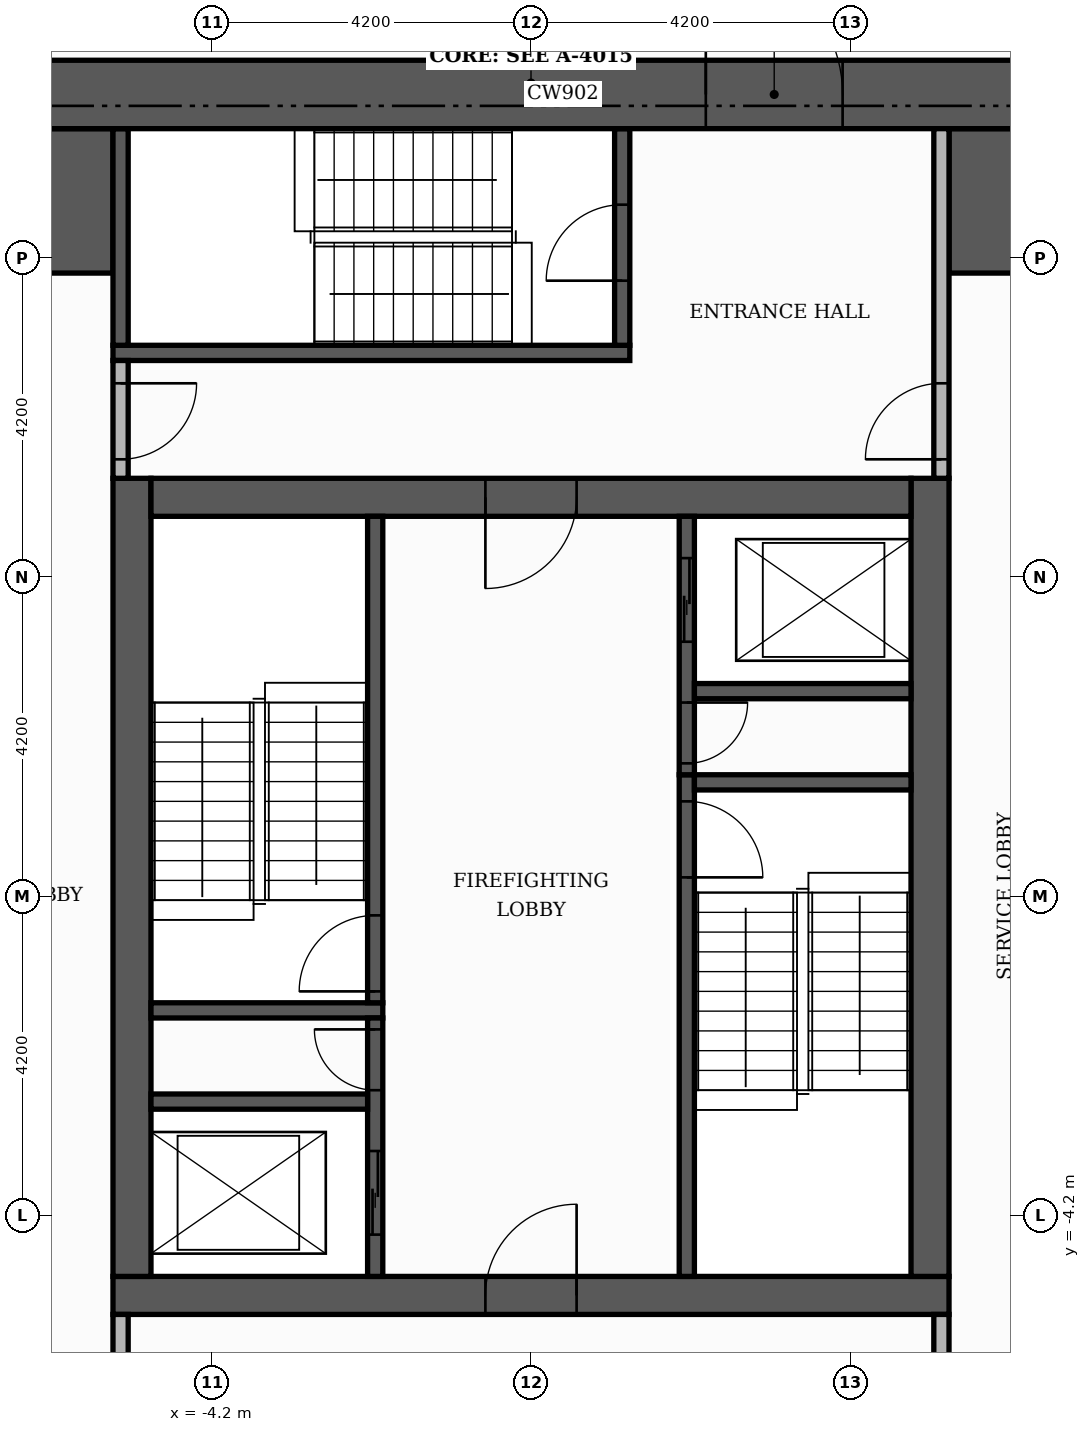
"""IFC4 building model, lengths in metres.
Left out: names, types, materials, properties, quantities, classifications, styles, units other than length and angle.
Written with IfcOpenShell. Run it as: python <this file> out.ifc"""

import sys

from ifc_helpers import new_model, si_unit, direction, frame, frame_2d, origin, place, context, subcontext, project, spatial, rectangle, extrude, element, fill, save


model = new_model("IFC4")
c1 = context("Model", 3, precision=1e-05, world=origin(), true_north=direction((0.0, 1.0)))
c2 = subcontext(c1, "Body", "Model", "MODEL_VIEW")
j1 = project(units=[si_unit("LENGTHUNIT", "METRE"), si_unit("PLANEANGLEUNIT", "RADIAN")], contexts=[c1])
p1 = place(None, origin())
s1 = spatial("IfcSite", under=j1, at=p1, CompositionType="ELEMENT")
p2 = place(p1, origin())
s2 = spatial("IfcBuilding", under=s1, at=p2, CompositionType="ELEMENT")
p3 = place(p2, frame((0.0, 0.0, 98.7)))
s3 = spatial("IfcBuildingStorey", under=s2, at=p3, CompositionType="ELEMENT", Elevation=98.7)
p4 = place(p3, frame((-5.5, -5.25, 0.0), z_axis=(0.0, 0.0, 1.0), x_axis=(1.0, 0.0, 0.0)))
e1 = element("IfcWall", 1, at=p4, inside=s3, PredefinedType="SHEAR", context=c2, shape_type="SweptSolid", body=[
    extrude(rectangle(XDim=11.0, YDim=0.5, at=frame_2d((5.5, 0.0))), origin(), (0.0, 0.0, 1.0), 3.48),
])
p5 = place(p4, frame((4.9, 0.0, 0.0)))
e2 = element("IfcOpeningElement", 2, at=p5, cuts=e1, PredefinedType="OPENING", context=c2, shape_type="SweptSolid", body=[
    extrude(rectangle(XDim=1.2, YDim=2.1, at=frame_2d((0.6, 1.05))), frame((0.0, 0.26, 0.0), z_axis=(0.0, -1.0, 0.0), x_axis=(1.0, 0.0, 0.0)), (0.0, 0.0, 1.0), 0.52),
])
for number, where, z_axis, x_axis in (
    (3, (-5.25, -5.0, 0.0), (0.0, 0.0, 1.0), (0.0, 1.0, 0.0)),
    (4, (5.25, -5.0, 0.0), (0.0, 0.0, 1.0), (0.0, 1.0, 0.0)),
):
    element("IfcWall", number, at=place(p3, frame(where, z_axis=z_axis, x_axis=x_axis)), inside=s3, PredefinedType="SHEAR", context=c2, shape_type="SweptSolid", body=[
        extrude(rectangle(XDim=10.5, YDim=0.5, at=frame_2d((5.25, 0.0))), origin(), (0.0, 0.0, 1.0), 3.48),
    ])
p6 = place(p3, frame((-5.0, 5.25, 0.0), z_axis=(0.0, 0.0, 1.0), x_axis=(1.0, 0.0, 0.0)))
e5 = element("IfcWall", 5, at=p6, inside=s3, PredefinedType="SHEAR", context=c2, shape_type="SweptSolid", body=[
    extrude(rectangle(XDim=10.0, YDim=0.5, at=frame_2d((5.0, 0.0))), origin(), (0.0, 0.0, 1.0), 3.48),
])
p7 = place(p6, frame((4.4, 0.0, 0.0)))
e6 = element("IfcOpeningElement", 6, at=p7, cuts=e5, PredefinedType="OPENING", context=c2, shape_type="SweptSolid", body=[
    extrude(rectangle(XDim=1.2, YDim=2.1, at=frame_2d((0.6, 1.05))), frame((0.0, 0.26, 0.0), z_axis=(0.0, -1.0, 0.0), x_axis=(1.0, 0.0, 0.0)), (0.0, 0.0, 1.0), 0.52),
])
for number, where, z_axis, x_axis in (
    (7, (-10.1, 9.15, 0.0), (0.0, 0.0, 1.0), (1.0, 0.0, 0.0)),
    (8, (5.5, 9.15, 0.0), (0.0, 0.0, 1.0), (1.0, 0.0, 0.0)),
):
    element("IfcWall", number, at=place(p3, frame(where, z_axis=z_axis, x_axis=x_axis)), inside=s3, PredefinedType="SHEAR", context=c2, shape_type="SweptSolid", body=[
        extrude(rectangle(XDim=4.6, YDim=1.9, at=frame_2d((2.3, 0.0))), origin(), (0.0, 0.0, 1.0), 3.48),
    ])
p8 = place(p3, frame((2.05, -5.0, 0.0), z_axis=(0.0, 0.0, 1.0), x_axis=(0.0, 1.0, 0.0)))
e9 = element("IfcWall", 9, at=p8, inside=s3, PredefinedType="SHEAR", context=c2, shape_type="SweptSolid", body=[
    extrude(rectangle(XDim=6.6, YDim=0.2, at=frame_2d((3.3, 0.0))), origin(), (0.0, 0.0, 1.0), 3.48),
])
p9 = place(p8, frame((5.25, 0.0, 0.0)))
e10 = element("IfcOpeningElement", 10, at=p9, cuts=e9, PredefinedType="OPENING", context=c2, shape_type="SweptSolid", body=[
    extrude(rectangle(XDim=1.0, YDim=2.1, at=frame_2d((0.5, 1.05))), frame((0.0, 0.11, 0.0), z_axis=(0.0, -1.0, 0.0), x_axis=(1.0, 0.0, 0.0)), (0.0, 0.0, 1.0), 0.22),
])
p10 = place(p3, frame((-5.0, -1.5, 0.0), z_axis=(0.0, 0.0, 1.0), x_axis=(1.0, 0.0, 0.0)))
e11 = element("IfcWall", 11, at=p10, inside=s3, PredefinedType="SHEAR", context=c2, shape_type="SweptSolid", body=[
    extrude(rectangle(XDim=3.05, YDim=0.2, at=frame_2d((1.525, 0.0))), origin(), (0.0, 0.0, 1.0), 3.48),
])
p11 = place(p3, frame((-2.05, -1.4, 0.0), z_axis=(0.0, 0.0, 1.0), x_axis=(0.0, 1.0, 0.0)))
e12 = element("IfcWall", 12, at=p11, inside=s3, PredefinedType="SHEAR", context=c2, shape_type="SweptSolid", body=[
    extrude(rectangle(XDim=6.4, YDim=0.2, at=frame_2d((3.2, 0.0))), origin(), (0.0, 0.0, 1.0), 3.48),
])
p12 = place(p11, frame((0.15, 0.0, 0.0)))
e13 = element("IfcOpeningElement", 13, at=p12, cuts=e12, PredefinedType="OPENING", context=c2, shape_type="SweptSolid", body=[
    extrude(rectangle(XDim=1.0, YDim=2.1, at=frame_2d((0.5, 1.05))), frame((0.0, 0.11, 0.0), z_axis=(0.0, -1.0, 0.0), x_axis=(1.0, 0.0, 0.0)), (0.0, 0.0, 1.0), 0.22),
])
p13 = place(p3, frame((2.15, 1.5, 0.0), z_axis=(0.0, 0.0, 1.0), x_axis=(1.0, 0.0, 0.0)))
e14 = element("IfcWall", 14, at=p13, inside=s3, PredefinedType="SHEAR", context=c2, shape_type="SweptSolid", body=[
    extrude(rectangle(XDim=2.85, YDim=0.2, at=frame_2d((1.425, 0.0))), origin(), (0.0, 0.0, 1.0), 3.48),
])
p14 = place(p3, frame((-5.5, 7.15, 0.0), z_axis=(0.0, 0.0, 1.0), x_axis=(1.0, 0.0, 0.0)))
e15 = element("IfcWall", 15, at=p14, inside=s3, PredefinedType="SHEAR", context=c2, shape_type="SweptSolid", body=[
    extrude(rectangle(XDim=6.8, YDim=0.2, at=frame_2d((3.4, 0.0))), origin(), (0.0, 0.0, 1.0), 3.48),
])
p15 = place(p3, frame((-5.4, 7.25, 0.0), z_axis=(0.0, 0.0, 1.0), x_axis=(0.0, 1.0, 0.0)))
e16 = element("IfcWall", 16, at=p15, inside=s3, PredefinedType="SHEAR", context=c2, shape_type="SweptSolid", body=[
    extrude(rectangle(XDim=2.85, YDim=0.2, at=frame_2d((1.425, 0.0))), origin(), (0.0, 0.0, 1.0), 3.48),
])
p16 = place(p3, frame((1.2, 7.25, 0.0), z_axis=(0.0, 0.0, 1.0), x_axis=(0.0, 1.0, 0.0)))
e17 = element("IfcWall", 17, at=p16, inside=s3, PredefinedType="SHEAR", context=c2, shape_type="SweptSolid", body=[
    extrude(rectangle(XDim=2.85, YDim=0.2, at=frame_2d((1.425, 0.0))), origin(), (0.0, 0.0, 1.0), 3.48),
])
p17 = place(p16, frame((0.85, 0.0, 0.0)))
e18 = element("IfcOpeningElement", 18, at=p17, cuts=e17, PredefinedType="OPENING", context=c2, shape_type="SweptSolid", body=[
    extrude(rectangle(XDim=1.0, YDim=2.1, at=frame_2d((0.5, 1.05))), frame((0.0, 0.11, 0.0), z_axis=(0.0, -1.0, 0.0), x_axis=(1.0, 0.0, 0.0)), (0.0, 0.0, 1.0), 0.22),
])
p18 = place(p3, frame((-2.05, -5.0, 0.0), z_axis=(0.0, 0.0, 1.0), x_axis=(0.0, 1.0, 0.0)))
e19 = element("IfcWall", 19, at=p18, inside=s3, PredefinedType="SHEAR", context=c2, shape_type="SweptSolid", body=[
    extrude(rectangle(XDim=3.4, YDim=0.2, at=frame_2d((1.7, 0.0))), origin(), (0.0, 0.0, 1.0), 3.48),
])
p19 = place(p18, frame((0.55, 0.0, 0.0)))
e20 = element("IfcOpeningElement", 20, at=p19, cuts=e19, PredefinedType="OPENING", context=c2, shape_type="SweptSolid", body=[
    extrude(rectangle(XDim=1.1, YDim=2.1, at=frame_2d((0.55, 1.05))), frame((0.0, 0.11, 0.0), z_axis=(0.0, -1.0, 0.0), x_axis=(1.0, 0.0, 0.0)), (0.0, 0.0, 1.0), 0.22),
])
p20 = place(p18, frame((2.45, 0.0, 0.0)))
e21 = element("IfcOpeningElement", 21, at=p20, cuts=e19, PredefinedType="OPENING", context=c2, shape_type="SweptSolid", body=[
    extrude(rectangle(XDim=0.8, YDim=2.1, at=frame_2d((0.4, 1.05))), frame((0.0, 0.11, 0.0), z_axis=(0.0, -1.0, 0.0), x_axis=(1.0, 0.0, 0.0)), (0.0, 0.0, 1.0), 0.22),
])
p21 = place(p3, frame((-5.0, -2.7, 0.0), z_axis=(0.0, 0.0, 1.0), x_axis=(1.0, 0.0, 0.0)))
e22 = element("IfcWall", 22, at=p21, inside=s3, PredefinedType="SHEAR", context=c2, shape_type="SweptSolid", body=[
    extrude(rectangle(XDim=2.85, YDim=0.2, at=frame_2d((1.425, 0.0))), origin(), (0.0, 0.0, 1.0), 3.48),
])
p22 = place(p3, frame((2.05, 1.6, 0.0), z_axis=(0.0, 0.0, 1.0), x_axis=(0.0, 1.0, 0.0)))
e23 = element("IfcWall", 23, at=p22, inside=s3, PredefinedType="SHEAR", context=c2, shape_type="SweptSolid", body=[
    extrude(rectangle(XDim=3.4, YDim=0.2, at=frame_2d((1.7, 0.0))), origin(), (0.0, 0.0, 1.0), 3.48),
])
p23 = place(p22, frame((1.75, 0.0, 0.0)))
e24 = element("IfcOpeningElement", 24, at=p23, cuts=e23, PredefinedType="OPENING", context=c2, shape_type="SweptSolid", body=[
    extrude(rectangle(XDim=1.1, YDim=2.1, at=frame_2d((0.55, 1.05))), frame((0.0, 0.11, 0.0), z_axis=(0.0, -1.0, 0.0), x_axis=(1.0, 0.0, 0.0)), (0.0, 0.0, 1.0), 0.22),
])
p24 = place(p22, frame((0.15, 0.0, 0.0)))
e25 = element("IfcOpeningElement", 25, at=p24, cuts=e23, PredefinedType="OPENING", context=c2, shape_type="SweptSolid", body=[
    extrude(rectangle(XDim=0.8, YDim=2.1, at=frame_2d((0.4, 1.05))), frame((0.0, 0.11, 0.0), z_axis=(0.0, -1.0, 0.0), x_axis=(1.0, 0.0, 0.0)), (0.0, 0.0, 1.0), 0.22),
])
p25 = place(p3, frame((2.15, 2.7, 0.0), z_axis=(0.0, 0.0, 1.0), x_axis=(1.0, 0.0, 0.0)))
e26 = element("IfcWall", 26, at=p25, inside=s3, PredefinedType="SHEAR", context=c2, shape_type="SweptSolid", body=[
    extrude(rectangle(XDim=2.85, YDim=0.2, at=frame_2d((1.425, 0.0))), origin(), (0.0, 0.0, 1.0), 3.48),
])
p26 = place(p3, frame((-11.0, 10.55, 0.0), z_axis=(0.0, 0.0, 1.0), x_axis=(1.0, 0.0, 0.0)))
e27 = element("IfcWall", 27, at=p26, inside=s3, PredefinedType="SHEAR", context=c2, shape_type="SweptSolid", body=[
    extrude(rectangle(XDim=22.0, YDim=0.9, at=frame_2d((11.0, 0.0))), origin(), (0.0, 0.0, 1.0), 3.48),
])
p27 = place(p26, frame((13.3, 0.0, 0.0)))
e28 = element("IfcOpeningElement", 28, at=p27, cuts=e27, PredefinedType="OPENING", context=c2, shape_type="SweptSolid", body=[
    extrude(rectangle(XDim=1.8, YDim=2.2, at=frame_2d((0.9, 1.1))), frame((0.0, 0.46, 0.0), z_axis=(0.0, -1.0, 0.0), x_axis=(1.0, 0.0, 0.0)), (0.0, 0.0, 1.0), 0.92),
])
p28 = place(p3, frame((-5.4, -10.1, 0.0), z_axis=(0.0, 0.0, 1.0), x_axis=(0.0, 1.0, 0.0)))
e29 = element("IfcWall", 29, at=p28, inside=s3, PredefinedType="PARTITIONING", context=c2, shape_type="SweptSolid", body=[
    extrude(rectangle(XDim=4.6, YDim=0.2, at=frame_2d((2.3, 0.0))), origin(), (0.0, 0.0, 1.0), 3.48),
])
p29 = place(p28, frame((2.9, 0.0, 0.0)))
e30 = element("IfcOpeningElement", 30, at=p29, cuts=e29, PredefinedType="OPENING", context=c2, shape_type="SweptSolid", body=[
    extrude(rectangle(XDim=1.0, YDim=2.1, at=frame_2d((0.5, 1.05))), frame((0.0, 0.11, 0.0), z_axis=(0.0, -1.0, 0.0), x_axis=(1.0, 0.0, 0.0)), (0.0, 0.0, 1.0), 0.22),
])
p30 = place(p3, frame((5.4, -7.9, 0.0), z_axis=(0.0, 0.0, 1.0), x_axis=(0.0, 1.0, 0.0)))
e31 = element("IfcWall", 31, at=p30, inside=s3, PredefinedType="PARTITIONING", context=c2, shape_type="SweptSolid", body=[
    extrude(rectangle(XDim=2.4, YDim=0.2, at=frame_2d((1.2, 0.0))), origin(), (0.0, 0.0, 1.0), 3.48),
])
p31 = place(p30, frame((0.7, 0.0, 0.0)))
e32 = element("IfcOpeningElement", 32, at=p31, cuts=e31, PredefinedType="OPENING", context=c2, shape_type="SweptSolid", body=[
    extrude(rectangle(XDim=1.0, YDim=2.1, at=frame_2d((0.5, 1.05))), frame((0.0, 0.11, 0.0), z_axis=(0.0, -1.0, 0.0), x_axis=(1.0, 0.0, 0.0)), (0.0, 0.0, 1.0), 0.22),
])
p32 = place(p3, frame((-5.4, 5.5, 0.0), z_axis=(0.0, 0.0, 1.0), x_axis=(0.0, 1.0, 0.0)))
e33 = element("IfcWall", 33, at=p32, inside=s3, PredefinedType="PARTITIONING", context=c2, shape_type="SweptSolid", body=[
    extrude(rectangle(XDim=1.55, YDim=0.2, at=frame_2d((0.775, 0.0))), origin(), (0.0, 0.0, 1.0), 3.48),
])
p33 = place(p32, frame((0.25, 0.0, 0.0)))
e34 = element("IfcOpeningElement", 34, at=p33, cuts=e33, PredefinedType="OPENING", context=c2, shape_type="SweptSolid", body=[
    extrude(rectangle(XDim=1.0, YDim=2.1, at=frame_2d((0.5, 1.05))), frame((0.0, 0.11, 0.0), z_axis=(0.0, -1.0, 0.0), x_axis=(1.0, 0.0, 0.0)), (0.0, 0.0, 1.0), 0.22),
])
p34 = place(p3, frame((5.4, 5.5, 0.0), z_axis=(0.0, 0.0, 1.0), x_axis=(0.0, 1.0, 0.0)))
e35 = element("IfcWall", 35, at=p34, inside=s3, PredefinedType="PARTITIONING", context=c2, shape_type="SweptSolid", body=[
    extrude(rectangle(XDim=4.6, YDim=0.2, at=frame_2d((2.3, 0.0))), origin(), (0.0, 0.0, 1.0), 3.48),
])
p35 = place(p34, frame((0.25, 0.0, 0.0)))
e36 = element("IfcOpeningElement", 36, at=p35, cuts=e35, PredefinedType="OPENING", context=c2, shape_type="SweptSolid", body=[
    extrude(rectangle(XDim=1.0, YDim=2.1, at=frame_2d((0.5, 1.05))), frame((0.0, 0.11, 0.0), z_axis=(0.0, -1.0, 0.0), x_axis=(1.0, 0.0, 0.0)), (0.0, 0.0, 1.0), 0.22),
])
p36 = place(p23, origin())
e37 = element("IfcDoor", 37, at=p36, inside=s3, OperationType="SLIDING_TO_LEFT", PredefinedType="DOOR", context=c2, shape_type="SweptSolid", body=[
    extrude(rectangle(XDim=1.1, YDim=2.1, at=frame_2d((0.55, 1.05))), frame((0.0, 0.025, 0.0), z_axis=(0.0, -1.0, 0.0), x_axis=(1.0, 0.0, 0.0)), (0.0, 0.0, 1.0), 0.05),
])
fill(e24, e37)
p37 = place(p19, origin())
e38 = element("IfcDoor", 38, at=p37, inside=s3, OperationType="SLIDING_TO_LEFT", PredefinedType="DOOR", context=c2, shape_type="SweptSolid", body=[
    extrude(rectangle(XDim=1.1, YDim=2.1, at=frame_2d((0.55, 1.05))), frame((0.0, 0.025, 0.0), z_axis=(0.0, -1.0, 0.0), x_axis=(1.0, 0.0, 0.0)), (0.0, 0.0, 1.0), 0.05),
])
fill(e20, e38)
p38 = place(p12, origin())
e39 = element("IfcDoor", 39, at=p38, inside=s3, OperationType="SINGLE_SWING_LEFT", PredefinedType="DOOR", context=c2, shape_type="SweptSolid", body=[
    extrude(rectangle(XDim=1.0, YDim=2.1, at=frame_2d((0.5, 1.05))), frame((0.0, 0.025, 0.0), z_axis=(0.0, -1.0, 0.0), x_axis=(1.0, 0.0, 0.0)), (0.0, 0.0, 1.0), 0.05),
])
fill(e13, e39)
p39 = place(p9, frame((1.0, 0.0, 0.0), z_axis=(0.0, 0.0, 1.0), x_axis=(-1.0, 0.0, 0.0)))
e40 = element("IfcDoor", 40, at=p39, inside=s3, OperationType="SINGLE_SWING_LEFT", PredefinedType="DOOR", context=c2, shape_type="SweptSolid", body=[
    extrude(rectangle(XDim=1.0, YDim=2.1, at=frame_2d((0.5, 1.05))), frame((0.0, 0.025, 0.0), z_axis=(0.0, -1.0, 0.0), x_axis=(1.0, 0.0, 0.0)), (0.0, 0.0, 1.0), 0.05),
])
fill(e10, e40)
p40 = place(p24, frame((0.8, 0.0, 0.0), z_axis=(0.0, 0.0, 1.0), x_axis=(-1.0, 0.0, 0.0)))
e41 = element("IfcDoor", 41, at=p40, inside=s3, OperationType="SINGLE_SWING_RIGHT", PredefinedType="DOOR", context=c2, shape_type="SweptSolid", body=[
    extrude(rectangle(XDim=0.8, YDim=2.1, at=frame_2d((0.4, 1.05))), frame((0.0, 0.025, 0.0), z_axis=(0.0, -1.0, 0.0), x_axis=(1.0, 0.0, 0.0)), (0.0, 0.0, 1.0), 0.05),
])
fill(e25, e41)
p41 = place(p20, origin())
e42 = element("IfcDoor", 42, at=p41, inside=s3, OperationType="SINGLE_SWING_RIGHT", PredefinedType="DOOR", context=c2, shape_type="SweptSolid", body=[
    extrude(rectangle(XDim=0.8, YDim=2.1, at=frame_2d((0.4, 1.05))), frame((0.0, 0.025, 0.0), z_axis=(0.0, -1.0, 0.0), x_axis=(1.0, 0.0, 0.0)), (0.0, 0.0, 1.0), 0.05),
])
fill(e21, e42)
p42 = place(p7, frame((1.2, 0.0, 0.0), z_axis=(0.0, 0.0, 1.0), x_axis=(-1.0, 0.0, 0.0)))
e43 = element("IfcDoor", 43, at=p42, inside=s3, OperationType="SINGLE_SWING_LEFT", PredefinedType="DOOR", context=c2, shape_type="SweptSolid", body=[
    extrude(rectangle(XDim=1.2, YDim=2.1, at=frame_2d((0.6, 1.05))), frame((0.0, 0.025, 0.0), z_axis=(0.0, -1.0, 0.0), x_axis=(1.0, 0.0, 0.0)), (0.0, 0.0, 1.0), 0.05),
])
fill(e6, e43)
p43 = place(p5, origin())
e44 = element("IfcDoor", 44, at=p43, inside=s3, OperationType="SINGLE_SWING_RIGHT", PredefinedType="DOOR", context=c2, shape_type="SweptSolid", body=[
    extrude(rectangle(XDim=1.2, YDim=2.1, at=frame_2d((0.6, 1.05))), frame((0.0, 0.025, 0.0), z_axis=(0.0, -1.0, 0.0), x_axis=(1.0, 0.0, 0.0)), (0.0, 0.0, 1.0), 0.05),
])
fill(e2, e44)
p44 = place(p17, origin())
e45 = element("IfcDoor", 45, at=p44, inside=s3, OperationType="SINGLE_SWING_LEFT", PredefinedType="DOOR", context=c2, shape_type="SweptSolid", body=[
    extrude(rectangle(XDim=1.0, YDim=2.1, at=frame_2d((0.5, 1.05))), frame((0.0, 0.025, 0.0), z_axis=(0.0, -1.0, 0.0), x_axis=(1.0, 0.0, 0.0)), (0.0, 0.0, 1.0), 0.05),
])
fill(e18, e45)
p45 = place(p33, frame((1.0, 0.0, 0.0), z_axis=(0.0, 0.0, 1.0), x_axis=(-1.0, 0.0, 0.0)))
e46 = element("IfcDoor", 46, at=p45, inside=s3, OperationType="SINGLE_SWING_RIGHT", PredefinedType="DOOR", context=c2, shape_type="SweptSolid", body=[
    extrude(rectangle(XDim=1.0, YDim=2.1, at=frame_2d((0.5, 1.05))), frame((0.0, 0.025, 0.0), z_axis=(0.0, -1.0, 0.0), x_axis=(1.0, 0.0, 0.0)), (0.0, 0.0, 1.0), 0.05),
])
fill(e34, e46)
p46 = place(p35, origin())
e47 = element("IfcDoor", 47, at=p46, inside=s3, OperationType="SINGLE_SWING_LEFT", PredefinedType="DOOR", context=c2, shape_type="SweptSolid", body=[
    extrude(rectangle(XDim=1.0, YDim=2.1, at=frame_2d((0.5, 1.05))), frame((0.0, 0.025, 0.0), z_axis=(0.0, -1.0, 0.0), x_axis=(1.0, 0.0, 0.0)), (0.0, 0.0, 1.0), 0.05),
])
fill(e36, e47)
p47 = place(p27, origin())
e48 = element("IfcDoor", 48, at=p47, inside=s3, OperationType="DOUBLE_DOOR_SINGLE_SWING", PredefinedType="DOOR", context=c2, shape_type="SweptSolid", body=[
    extrude(rectangle(XDim=1.8, YDim=2.2, at=frame_2d((0.9, 1.1))), frame((0.0, 0.025, 0.0), z_axis=(0.0, -1.0, 0.0), x_axis=(1.0, 0.0, 0.0)), (0.0, 0.0, 1.0), 0.05),
])
fill(e28, e48)
save(model, sys.argv[1])
